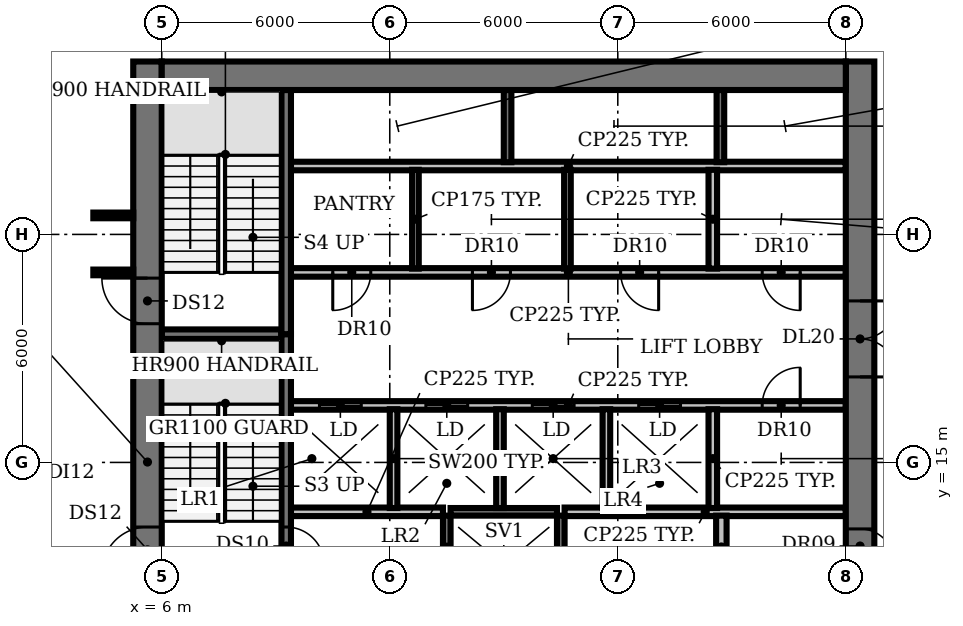
"""IFC4 building model, lengths in metres.
Left out: names, types, materials, properties, quantities, classifications, styles, units other than length and angle.
Written with IfcOpenShell. Run it as: python <this file> out.ifc"""

import sys

from ifc_helpers import new_model, si_unit, direction, frame, frame_2d, origin, place, context, subcontext, project, spatial, rectangle, extrude, element, fill, save


model = new_model("IFC4")
c1 = context("Model", 3, precision=1e-05, world=origin(), true_north=direction((0.0, 1.0)))
c2 = subcontext(c1, "Body", "Model", "MODEL_VIEW")
j1 = project(units=[si_unit("LENGTHUNIT", "METRE"), si_unit("PLANEANGLEUNIT", "RADIAN")], contexts=[c1])
p1 = place(None, origin())
s1 = spatial("IfcSite", under=j1, at=p1, CompositionType="ELEMENT")
p2 = place(p1, origin())
s2 = spatial("IfcBuilding", under=s1, at=p2, CompositionType="ELEMENT")
p3 = place(p2, frame((0.0, 0.0, 129.8)))
s3 = spatial("IfcBuildingStorey", under=s2, at=p3, CompositionType="ELEMENT", Elevation=129.8)
p4 = place(p3, frame((9.4, 13.7, 0.0), z_axis=(0.0, 0.0, 1.0), x_axis=(1.0, 0.0, 0.0)))
e1 = element("IfcWall", 1, at=p4, inside=s3, PredefinedType="PARTITIONING", context=c2, shape_type="SweptSolid", body=[
    extrude(rectangle(XDim=4.0, YDim=0.225, at=frame_2d((2.0, 0.0))), origin(), (0.0, 0.0, 1.0), 3.85),
])
p5 = place(p3, frame((13.6, 13.7, 0.0), z_axis=(0.0, 0.0, 1.0), x_axis=(1.0, 0.0, 0.0)))
e2 = element("IfcWall", 2, at=p5, inside=s3, PredefinedType="SHEAR", context=c2, shape_type="SweptSolid", body=[
    extrude(rectangle(XDim=2.8, YDim=0.2, at=frame_2d((1.4, 0.0))), origin(), (0.0, 0.0, 1.0), 3.85),
])
p6 = place(p3, frame((16.6, 13.7, 0.0), z_axis=(0.0, 0.0, 1.0), x_axis=(1.0, 0.0, 0.0)))
e3 = element("IfcWall", 3, at=p6, inside=s3, PredefinedType="PARTITIONING", context=c2, shape_type="SweptSolid", body=[
    extrude(rectangle(XDim=7.4, YDim=0.225, at=frame_2d((3.7, 0.0))), origin(), (0.0, 0.0, 1.0), 3.85),
])
p7 = place(p3, frame((9.4, 16.5, 0.0), z_axis=(0.0, 0.0, 1.0), x_axis=(1.0, 0.0, 0.0)))
e4 = element("IfcWall", 4, at=p7, inside=s3, PredefinedType="PARTITIONING", context=c2, shape_type="SweptSolid", body=[
    extrude(rectangle(XDim=14.6, YDim=0.225, at=frame_2d((7.3, 0.0))), origin(), (0.0, 0.0, 1.0), 3.85),
])
p8 = place(p7, frame((0.75, 0.0, 0.0)))
e5 = element("IfcOpeningElement", 5, at=p8, cuts=e4, PredefinedType="OPENING", context=c2, shape_type="SweptSolid", body=[
    extrude(rectangle(XDim=1.1, YDim=2.1, at=frame_2d((0.55, 1.05))), frame((0.0, 0.123, 0.0), z_axis=(0.0, -1.0, 0.0), x_axis=(1.0, 0.0, 0.0)), (0.0, 0.0, 1.0), 0.245),
])
p9 = place(p7, frame((3.55, 0.0, 0.0)))
e6 = element("IfcOpeningElement", 6, at=p9, cuts=e4, PredefinedType="OPENING", context=c2, shape_type="SweptSolid", body=[
    extrude(rectangle(XDim=1.1, YDim=2.1, at=frame_2d((0.55, 1.05))), frame((0.0, 0.123, 0.0), z_axis=(0.0, -1.0, 0.0), x_axis=(1.0, 0.0, 0.0)), (0.0, 0.0, 1.0), 0.245),
])
p10 = place(p7, frame((6.35, 0.0, 0.0)))
e7 = element("IfcOpeningElement", 7, at=p10, cuts=e4, PredefinedType="OPENING", context=c2, shape_type="SweptSolid", body=[
    extrude(rectangle(XDim=1.1, YDim=2.1, at=frame_2d((0.55, 1.05))), frame((0.0, 0.123, 0.0), z_axis=(0.0, -1.0, 0.0), x_axis=(1.0, 0.0, 0.0)), (0.0, 0.0, 1.0), 0.245),
])
p11 = place(p7, frame((9.15, 0.0, 0.0)))
e8 = element("IfcOpeningElement", 8, at=p11, cuts=e4, PredefinedType="OPENING", context=c2, shape_type="SweptSolid", body=[
    extrude(rectangle(XDim=1.1, YDim=2.1, at=frame_2d((0.55, 1.05))), frame((0.0, 0.123, 0.0), z_axis=(0.0, -1.0, 0.0), x_axis=(1.0, 0.0, 0.0)), (0.0, 0.0, 1.0), 0.245),
])
p12 = place(p7, frame((12.4, 0.0, 0.0)))
e9 = element("IfcOpeningElement", 9, at=p12, cuts=e4, PredefinedType="OPENING", context=c2, shape_type="SweptSolid", body=[
    extrude(rectangle(XDim=1.0, YDim=2.1, at=frame_2d((0.5, 1.05))), frame((0.0, 0.123, 0.0), z_axis=(0.0, -1.0, 0.0), x_axis=(1.0, 0.0, 0.0)), (0.0, 0.0, 1.0), 0.245),
])
p13 = place(p3, frame((6.0, 18.375, 0.0), z_axis=(0.0, 0.0, 1.0), x_axis=(1.0, 0.0, 0.0)))
e10 = element("IfcWall", 10, at=p13, inside=s3, PredefinedType="SHEAR", context=c2, shape_type="SweptSolid", body=[
    extrude(rectangle(XDim=3.15, YDim=0.25, at=frame_2d((1.575, 0.0))), origin(), (0.0, 0.0, 1.0), 3.85),
])
p14 = place(p3, frame((24.0, 20.0, 0.0), z_axis=(0.0, 0.0, 1.0), x_axis=(-1.0, 0.0, 0.0)))
e11 = element("IfcWall", 11, at=p14, inside=s3, PredefinedType="PARTITIONING", context=c2, shape_type="SweptSolid", body=[
    extrude(rectangle(XDim=14.6, YDim=0.225, at=frame_2d((7.3, 0.0))), origin(), (0.0, 0.0, 1.0), 3.85),
])
p15 = place(p14, frame((12.5, 0.0, 0.0)))
e12 = element("IfcOpeningElement", 12, at=p15, cuts=e11, PredefinedType="OPENING", context=c2, shape_type="SweptSolid", body=[
    extrude(rectangle(XDim=1.0, YDim=2.1, at=frame_2d((0.5, 1.05))), frame((0.0, 0.123, 0.0), z_axis=(0.0, -1.0, 0.0), x_axis=(1.0, 0.0, 0.0)), (0.0, 0.0, 1.0), 0.245),
])
p16 = place(p14, frame((8.825, 0.0, 0.0)))
e13 = element("IfcOpeningElement", 13, at=p16, cuts=e11, PredefinedType="OPENING", context=c2, shape_type="SweptSolid", body=[
    extrude(rectangle(XDim=1.0, YDim=2.1, at=frame_2d((0.5, 1.05))), frame((0.0, 0.123, 0.0), z_axis=(0.0, -1.0, 0.0), x_axis=(1.0, 0.0, 0.0)), (0.0, 0.0, 1.0), 0.245),
])
p17 = place(p14, frame((4.925, 0.0, 0.0)))
e14 = element("IfcOpeningElement", 14, at=p17, cuts=e11, PredefinedType="OPENING", context=c2, shape_type="SweptSolid", body=[
    extrude(rectangle(XDim=1.0, YDim=2.1, at=frame_2d((0.5, 1.05))), frame((0.0, 0.123, 0.0), z_axis=(0.0, -1.0, 0.0), x_axis=(1.0, 0.0, 0.0)), (0.0, 0.0, 1.0), 0.245),
])
p18 = place(p14, frame((1.2, 0.0, 0.0)))
e15 = element("IfcOpeningElement", 15, at=p18, cuts=e11, PredefinedType="OPENING", context=c2, shape_type="SweptSolid", body=[
    extrude(rectangle(XDim=1.0, YDim=2.1, at=frame_2d((0.5, 1.05))), frame((0.0, 0.123, 0.0), z_axis=(0.0, -1.0, 0.0), x_axis=(1.0, 0.0, 0.0)), (0.0, 0.0, 1.0), 0.245),
])
p19 = place(p3, frame((9.4, 22.8, 0.0), z_axis=(0.0, 0.0, 1.0), x_axis=(1.0, 0.0, 0.0)))
e16 = element("IfcWall", 16, at=p19, inside=s3, PredefinedType="PARTITIONING", context=c2, shape_type="SweptSolid", body=[
    extrude(rectangle(XDim=14.6, YDim=0.225, at=frame_2d((7.3, 0.0))), origin(), (0.0, 0.0, 1.0), 3.85),
])
p20 = place(p3, frame((9.275, 18.375, 0.0), z_axis=(0.0, 0.0, 1.0), x_axis=(0.0, -1.0, 0.0)))
e17 = element("IfcWall", 17, at=p20, inside=s3, PredefinedType="SHEAR", context=c2, shape_type="SweptSolid", body=[
    extrude(rectangle(XDim=6.55, YDim=0.25, at=frame_2d((3.275, 0.0))), origin(), (0.0, 0.0, 1.0), 3.85),
])
p21 = place(p20, frame((5.075, 0.0, 0.0)))
e18 = element("IfcOpeningElement", 18, at=p21, cuts=e17, PredefinedType="OPENING", context=c2, shape_type="SweptSolid", body=[
    extrude(rectangle(XDim=1.0, YDim=2.1, at=frame_2d((0.5, 1.05))), frame((0.0, 0.135, 0.0), z_axis=(0.0, -1.0, 0.0), x_axis=(1.0, 0.0, 0.0)), (0.0, 0.0, 1.0), 0.27),
])
p22 = place(p3, frame((9.275, 18.375, 0.0), z_axis=(0.0, 0.0, 1.0), x_axis=(0.0, 1.0, 0.0)))
e19 = element("IfcWall", 19, at=p22, inside=s3, PredefinedType="SHEAR", context=c2, shape_type="SweptSolid", body=[
    extrude(rectangle(XDim=6.425, YDim=0.25, at=frame_2d((3.212, 0.0))), origin(), (0.0, 0.0, 1.0), 3.85),
])
p23 = place(p3, frame((12.1, 13.8, 0.0), z_axis=(0.0, 0.0, 1.0), x_axis=(0.0, 1.0, 0.0)))
e20 = element("IfcWall", 20, at=p23, inside=s3, PredefinedType="SOLIDWALL", context=c2, shape_type="SweptSolid", body=[
    extrude(rectangle(XDim=2.6, YDim=0.2, at=frame_2d((1.3, 0.0))), origin(), (0.0, 0.0, 1.0), 3.85),
])
p24 = place(p3, frame((12.675, 20.1, 0.0), z_axis=(0.0, 0.0, 1.0), x_axis=(0.0, 1.0, 0.0)))
e21 = element("IfcWall", 21, at=p24, inside=s3, PredefinedType="PARTITIONING", context=c2, shape_type="SweptSolid", body=[
    extrude(rectangle(XDim=2.6, YDim=0.175, at=frame_2d((1.3, 0.0))), origin(), (0.0, 0.0, 1.0), 3.85),
])
p25 = place(p3, frame((13.5, 5.4, 0.0), z_axis=(0.0, 0.0, 1.0), x_axis=(0.0, 1.0, 0.0)))
e22 = element("IfcWall", 22, at=p25, inside=s3, PredefinedType="SHEAR", context=c2, shape_type="SweptSolid", body=[
    extrude(rectangle(XDim=8.2, YDim=0.2, at=frame_2d((4.1, 0.0))), origin(), (0.0, 0.0, 1.0), 3.85),
])
p26 = place(p25, frame((0.75, 0.0, 0.0)))
e23 = element("IfcOpeningElement", 23, at=p26, cuts=e22, PredefinedType="OPENING", context=c2, shape_type="SweptSolid", body=[
    extrude(rectangle(XDim=1.1, YDim=2.1, at=frame_2d((0.55, 1.05))), frame((0.0, 0.11, 0.0), z_axis=(0.0, -1.0, 0.0), x_axis=(1.0, 0.0, 0.0)), (0.0, 0.0, 1.0), 0.22),
])
p27 = place(p25, frame((3.55, 0.0, 0.0)))
e24 = element("IfcOpeningElement", 24, at=p27, cuts=e22, PredefinedType="OPENING", context=c2, shape_type="SweptSolid", body=[
    extrude(rectangle(XDim=1.1, YDim=2.1, at=frame_2d((0.55, 1.05))), frame((0.0, 0.11, 0.0), z_axis=(0.0, -1.0, 0.0), x_axis=(1.0, 0.0, 0.0)), (0.0, 0.0, 1.0), 0.22),
])
p28 = place(p25, frame((6.35, 0.0, 0.0)))
e25 = element("IfcOpeningElement", 25, at=p28, cuts=e22, PredefinedType="OPENING", context=c2, shape_type="SweptSolid", body=[
    extrude(rectangle(XDim=1.1, YDim=2.1, at=frame_2d((0.55, 1.05))), frame((0.0, 0.11, 0.0), z_axis=(0.0, -1.0, 0.0), x_axis=(1.0, 0.0, 0.0)), (0.0, 0.0, 1.0), 0.22),
])
p29 = place(p3, frame((14.9, 13.8, 0.0), z_axis=(0.0, 0.0, 1.0), x_axis=(0.0, 1.0, 0.0)))
e26 = element("IfcWall", 26, at=p29, inside=s3, PredefinedType="SOLIDWALL", context=c2, shape_type="SweptSolid", body=[
    extrude(rectangle(XDim=2.6, YDim=0.2, at=frame_2d((1.3, 0.0))), origin(), (0.0, 0.0, 1.0), 3.85),
])
p30 = place(p3, frame((15.1, 22.9, 0.0), z_axis=(0.0, 0.0, 1.0), x_axis=(0.0, 1.0, 0.0)))
e27 = element("IfcWall", 27, at=p30, inside=s3, PredefinedType="SHEAR", context=c2, shape_type="SweptSolid", body=[
    extrude(rectangle(XDim=1.9, YDim=0.2, at=frame_2d((0.95, 0.0))), origin(), (0.0, 0.0, 1.0), 3.85),
])
p31 = place(p3, frame((16.5, 5.4, 0.0), z_axis=(0.0, 0.0, 1.0), x_axis=(0.0, 1.0, 0.0)))
e28 = element("IfcWall", 28, at=p31, inside=s3, PredefinedType="SHEAR", context=c2, shape_type="SweptSolid", body=[
    extrude(rectangle(XDim=8.2, YDim=0.2, at=frame_2d((4.1, 0.0))), origin(), (0.0, 0.0, 1.0), 3.85),
])
p32 = place(p3, frame((16.675, 20.1, 0.0), z_axis=(0.0, 0.0, 1.0), x_axis=(0.0, 1.0, 0.0)))
e29 = element("IfcWall", 29, at=p32, inside=s3, PredefinedType="PARTITIONING", context=c2, shape_type="SweptSolid", body=[
    extrude(rectangle(XDim=2.6, YDim=0.175, at=frame_2d((1.3, 0.0))), origin(), (0.0, 0.0, 1.0), 3.85),
])
p33 = place(p3, frame((17.7, 13.8, 0.0), z_axis=(0.0, 0.0, 1.0), x_axis=(0.0, 1.0, 0.0)))
e30 = element("IfcWall", 30, at=p33, inside=s3, PredefinedType="SOLIDWALL", context=c2, shape_type="SweptSolid", body=[
    extrude(rectangle(XDim=2.6, YDim=0.2, at=frame_2d((1.3, 0.0))), origin(), (0.0, 0.0, 1.0), 3.85),
])
for number, where, z_axis, x_axis in (
    (31, (20.5, 13.8, 0.0), (0.0, 0.0, 1.0), (0.0, 1.0, 0.0)),
    (32, (20.5, 20.1, 0.0), (0.0, 0.0, 1.0), (0.0, 1.0, 0.0)),
):
    element("IfcWall", number, at=place(p3, frame(where, z_axis=z_axis, x_axis=x_axis)), inside=s3, PredefinedType="PARTITIONING", context=c2, shape_type="SweptSolid", body=[
        extrude(rectangle(XDim=2.6, YDim=0.225, at=frame_2d((1.3, 0.0))), origin(), (0.0, 0.0, 1.0), 3.85),
    ])
p34 = place(p3, frame((20.7, 22.9, 0.0), z_axis=(0.0, 0.0, 1.0), x_axis=(0.0, 1.0, 0.0)))
e33 = element("IfcWall", 33, at=p34, inside=s3, PredefinedType="SHEAR", context=c2, shape_type="SweptSolid", body=[
    extrude(rectangle(XDim=1.9, YDim=0.2, at=frame_2d((0.95, 0.0))), origin(), (0.0, 0.0, 1.0), 3.85),
])
p35 = place(p3, frame((20.725, 11.95, 0.0), z_axis=(0.0, 0.0, 1.0), x_axis=(0.0, 1.0, 0.0)))
e34 = element("IfcWall", 34, at=p35, inside=s3, PredefinedType="PARTITIONING", context=c2, shape_type="SweptSolid", body=[
    extrude(rectangle(XDim=1.65, YDim=0.275, at=frame_2d((0.825, 0.0))), origin(), (0.0, 0.0, 1.0), 3.85),
])
p36 = place(p3, frame((5.625, 4.47, 0.0), z_axis=(0.0, 0.0, 1.0), x_axis=(0.0, 1.0, 0.0)))
e35 = element("IfcWall", 35, at=p36, inside=s3, PredefinedType="SHEAR", context=c2, shape_type="SweptSolid", body=[
    extrude(rectangle(XDim=21.08, YDim=0.75, at=frame_2d((10.54, 0.0))), origin(), (0.0, 0.0, 1.0), 3.85),
])
p37 = place(p36, frame((1.18, 0.0, 0.0)))
e36 = element("IfcOpeningElement", 36, at=p37, cuts=e35, PredefinedType="OPENING", context=c2, shape_type="SweptSolid", body=[
    extrude(rectangle(XDim=1.5, YDim=2.1, at=frame_2d((0.75, 1.05))), frame((0.0, 0.385, 0.0), z_axis=(0.0, -1.0, 0.0), x_axis=(1.0, 0.0, 0.0)), (0.0, 0.0, 1.0), 0.77),
])
p38 = place(p36, frame((7.63, 0.0, 0.0)))
e37 = element("IfcOpeningElement", 37, at=p38, cuts=e35, PredefinedType="OPENING", context=c2, shape_type="SweptSolid", body=[
    extrude(rectangle(XDim=1.2, YDim=2.1, at=frame_2d((0.6, 1.05))), frame((0.0, 0.385, 0.0), z_axis=(0.0, -1.0, 0.0), x_axis=(1.0, 0.0, 0.0)), (0.0, 0.0, 1.0), 0.77),
])
p39 = place(p36, frame((14.18, 0.0, 0.0)))
e38 = element("IfcOpeningElement", 38, at=p39, cuts=e35, PredefinedType="OPENING", context=c2, shape_type="SweptSolid", body=[
    extrude(rectangle(XDim=1.2, YDim=2.1, at=frame_2d((0.6, 1.05))), frame((0.0, 0.385, 0.0), z_axis=(0.0, -1.0, 0.0), x_axis=(1.0, 0.0, 0.0)), (0.0, 0.0, 1.0), 0.77),
])
p40 = place(p3, frame((24.375, 25.55, 0.0), z_axis=(0.0, 0.0, 1.0), x_axis=(0.0, -1.0, 0.0)))
e39 = element("IfcWall", 39, at=p40, inside=s3, PredefinedType="SHEAR", context=c2, shape_type="SweptSolid", body=[
    extrude(rectangle(XDim=21.13, YDim=0.75, at=frame_2d((10.565, 0.0))), origin(), (0.0, 0.0, 1.0), 3.85),
])
p41 = place(p40, frame((18.4, 0.0, 0.0)))
e40 = element("IfcOpeningElement", 40, at=p41, cuts=e39, PredefinedType="OPENING", context=c2, shape_type="SweptSolid", body=[
    extrude(rectangle(XDim=1.5, YDim=2.1, at=frame_2d((0.75, 1.05))), frame((0.0, 0.385, 0.0), z_axis=(0.0, -1.0, 0.0), x_axis=(1.0, 0.0, 0.0)), (0.0, 0.0, 1.0), 0.77),
])
p42 = place(p40, frame((12.3, 0.0, 0.0)))
e41 = element("IfcOpeningElement", 41, at=p42, cuts=e39, PredefinedType="OPENING", context=c2, shape_type="SweptSolid", body=[
    extrude(rectangle(XDim=0.9, YDim=2.1, at=frame_2d((0.45, 1.05))), frame((0.0, 0.385, 0.0), z_axis=(0.0, -1.0, 0.0), x_axis=(1.0, 0.0, 0.0)), (0.0, 0.0, 1.0), 0.77),
])
p43 = place(p40, frame((6.3, 0.0, 0.0)))
e42 = element("IfcOpeningElement", 42, at=p43, cuts=e39, PredefinedType="OPENING", context=c2, shape_type="SweptSolid", body=[
    extrude(rectangle(XDim=2.0, YDim=2.1, at=frame_2d((1.0, 1.05))), frame((0.0, 0.385, 0.0), z_axis=(0.0, -1.0, 0.0), x_axis=(1.0, 0.0, 0.0)), (0.0, 0.0, 1.0), 0.77),
])
p44 = place(p3, frame((6.0, 25.175, 0.0), z_axis=(0.0, 0.0, 1.0), x_axis=(1.0, 0.0, 0.0)))
e43 = element("IfcWall", 43, at=p44, inside=s3, PredefinedType="SHEAR", context=c2, shape_type="SweptSolid", body=[
    extrude(rectangle(XDim=18.0, YDim=0.75, at=frame_2d((9.0, 0.0))), origin(), (0.0, 0.0, 1.0), 3.85),
])
for number, where, z_axis, x_axis in (
    (44, (4.2, 20.0, 0.0), (0.0, 0.0, 1.0), (1.0, 0.0, 0.0)),
    (45, (4.2, 21.5, 0.0), (0.0, 0.0, 1.0), (1.0, 0.0, 0.0)),
):
    element("IfcWall", number, at=place(p3, frame(where, z_axis=z_axis, x_axis=x_axis)), inside=s3, PredefinedType="PARTITIONING", context=c2, shape_type="SweptSolid", body=[
        extrude(rectangle(XDim=1.05, YDim=0.15, at=frame_2d((0.525, 0.0))), origin(), (0.0, 0.0, 1.0), 2.83),
    ])
p45 = place(p8, origin())
e46 = element("IfcDoor", 46, at=p45, inside=s3, OperationType="DOUBLE_DOOR_SLIDING", PredefinedType="DOOR", context=c2, shape_type="SweptSolid", body=[
    extrude(rectangle(XDim=1.1, YDim=2.1, at=frame_2d((0.55, 1.05))), frame((0.0, 0.025, 0.0), z_axis=(0.0, -1.0, 0.0), x_axis=(1.0, 0.0, 0.0)), (0.0, 0.0, 1.0), 0.05),
])
fill(e5, e46)
p46 = place(p9, origin())
e47 = element("IfcDoor", 47, at=p46, inside=s3, OperationType="DOUBLE_DOOR_SLIDING", PredefinedType="DOOR", context=c2, shape_type="SweptSolid", body=[
    extrude(rectangle(XDim=1.1, YDim=2.1, at=frame_2d((0.55, 1.05))), frame((0.0, 0.025, 0.0), z_axis=(0.0, -1.0, 0.0), x_axis=(1.0, 0.0, 0.0)), (0.0, 0.0, 1.0), 0.05),
])
fill(e6, e47)
p47 = place(p10, origin())
e48 = element("IfcDoor", 48, at=p47, inside=s3, OperationType="DOUBLE_DOOR_SLIDING", PredefinedType="DOOR", context=c2, shape_type="SweptSolid", body=[
    extrude(rectangle(XDim=1.1, YDim=2.1, at=frame_2d((0.55, 1.05))), frame((0.0, 0.025, 0.0), z_axis=(0.0, -1.0, 0.0), x_axis=(1.0, 0.0, 0.0)), (0.0, 0.0, 1.0), 0.05),
])
fill(e7, e48)
p48 = place(p11, origin())
e49 = element("IfcDoor", 49, at=p48, inside=s3, OperationType="DOUBLE_DOOR_SLIDING", PredefinedType="DOOR", context=c2, shape_type="SweptSolid", body=[
    extrude(rectangle(XDim=1.1, YDim=2.1, at=frame_2d((0.55, 1.05))), frame((0.0, 0.025, 0.0), z_axis=(0.0, -1.0, 0.0), x_axis=(1.0, 0.0, 0.0)), (0.0, 0.0, 1.0), 0.05),
])
fill(e8, e49)
p49 = place(p12, origin())
e50 = element("IfcDoor", 50, at=p49, inside=s3, OperationType="SINGLE_SWING_RIGHT", PredefinedType="DOOR", context=c2, shape_type="SweptSolid", body=[
    extrude(rectangle(XDim=1.0, YDim=2.1, at=frame_2d((0.5, 1.05))), frame((0.0, 0.025, 0.0), z_axis=(0.0, -1.0, 0.0), x_axis=(1.0, 0.0, 0.0)), (0.0, 0.0, 1.0), 0.05),
])
fill(e9, e50)
p50 = place(p15, origin())
e51 = element("IfcDoor", 51, at=p50, inside=s3, OperationType="SINGLE_SWING_RIGHT", PredefinedType="DOOR", context=c2, shape_type="SweptSolid", body=[
    extrude(rectangle(XDim=1.0, YDim=2.1, at=frame_2d((0.5, 1.05))), frame((0.0, 0.025, 0.0), z_axis=(0.0, -1.0, 0.0), x_axis=(1.0, 0.0, 0.0)), (0.0, 0.0, 1.0), 0.05),
])
fill(e12, e51)
p51 = place(p16, origin())
e52 = element("IfcDoor", 52, at=p51, inside=s3, OperationType="SINGLE_SWING_RIGHT", PredefinedType="DOOR", context=c2, shape_type="SweptSolid", body=[
    extrude(rectangle(XDim=1.0, YDim=2.1, at=frame_2d((0.5, 1.05))), frame((0.0, 0.025, 0.0), z_axis=(0.0, -1.0, 0.0), x_axis=(1.0, 0.0, 0.0)), (0.0, 0.0, 1.0), 0.05),
])
fill(e13, e52)
p52 = place(p17, origin())
e53 = element("IfcDoor", 53, at=p52, inside=s3, OperationType="SINGLE_SWING_LEFT", PredefinedType="DOOR", context=c2, shape_type="SweptSolid", body=[
    extrude(rectangle(XDim=1.0, YDim=2.1, at=frame_2d((0.5, 1.05))), frame((0.0, 0.025, 0.0), z_axis=(0.0, -1.0, 0.0), x_axis=(1.0, 0.0, 0.0)), (0.0, 0.0, 1.0), 0.05),
])
fill(e14, e53)
p53 = place(p18, origin())
e54 = element("IfcDoor", 54, at=p53, inside=s3, OperationType="SINGLE_SWING_LEFT", PredefinedType="DOOR", context=c2, shape_type="SweptSolid", body=[
    extrude(rectangle(XDim=1.0, YDim=2.1, at=frame_2d((0.5, 1.05))), frame((0.0, 0.025, 0.0), z_axis=(0.0, -1.0, 0.0), x_axis=(1.0, 0.0, 0.0)), (0.0, 0.0, 1.0), 0.05),
])
fill(e15, e54)
p54 = place(p21, origin())
e55 = element("IfcDoor", 55, at=p54, inside=s3, OperationType="SINGLE_SWING_RIGHT", PredefinedType="DOOR", context=c2, shape_type="SweptSolid", body=[
    extrude(rectangle(XDim=1.0, YDim=2.1, at=frame_2d((0.5, 1.05))), frame((0.0, 0.025, 0.0), z_axis=(0.0, -1.0, 0.0), x_axis=(1.0, 0.0, 0.0)), (0.0, 0.0, 1.0), 0.05),
])
fill(e18, e55)
p55 = place(p28, origin())
e56 = element("IfcDoor", 56, at=p55, inside=s3, OperationType="DOUBLE_DOOR_SLIDING", PredefinedType="DOOR", context=c2, shape_type="SweptSolid", body=[
    extrude(rectangle(XDim=1.1, YDim=2.1, at=frame_2d((0.55, 1.05))), frame((0.0, 0.025, 0.0), z_axis=(0.0, -1.0, 0.0), x_axis=(1.0, 0.0, 0.0)), (0.0, 0.0, 1.0), 0.05),
])
fill(e25, e56)
p56 = place(p38, origin())
e57 = element("IfcDoor", 57, at=p56, inside=s3, OperationType="SINGLE_SWING_LEFT", PredefinedType="DOOR", context=c2, shape_type="SweptSolid", body=[
    extrude(rectangle(XDim=1.2, YDim=2.1, at=frame_2d((0.6, 1.05))), frame((0.0, 0.025, 0.0), z_axis=(0.0, -1.0, 0.0), x_axis=(1.0, 0.0, 0.0)), (0.0, 0.0, 1.0), 0.05),
])
fill(e37, e57)
p57 = place(p39, origin())
e58 = element("IfcDoor", 58, at=p57, inside=s3, OperationType="SINGLE_SWING_RIGHT", PredefinedType="DOOR", context=c2, shape_type="SweptSolid", body=[
    extrude(rectangle(XDim=1.2, YDim=2.1, at=frame_2d((0.6, 1.05))), frame((0.0, 0.025, 0.0), z_axis=(0.0, -1.0, 0.0), x_axis=(1.0, 0.0, 0.0)), (0.0, 0.0, 1.0), 0.05),
])
fill(e38, e58)
p58 = place(p42, origin())
e59 = element("IfcDoor", 59, at=p58, inside=s3, OperationType="SINGLE_SWING_RIGHT", PredefinedType="DOOR", context=c2, shape_type="SweptSolid", body=[
    extrude(rectangle(XDim=0.9, YDim=2.1, at=frame_2d((0.45, 1.05))), frame((0.0, -0.315, 0.0), z_axis=(0.0, -1.0, 0.0), x_axis=(1.0, 0.0, 0.0)), (0.0, 0.0, 1.0), 0.05),
])
fill(e41, e59)
p59 = place(p43, origin())
e60 = element("IfcDoor", 60, at=p59, inside=s3, OperationType="DOUBLE_DOOR_SINGLE_SWING", PredefinedType="DOOR", context=c2, shape_type="SweptSolid", body=[
    extrude(rectangle(XDim=2.0, YDim=2.1, at=frame_2d((1.0, 1.05))), frame((0.0, 0.025, 0.0), z_axis=(0.0, -1.0, 0.0), x_axis=(1.0, 0.0, 0.0)), (0.0, 0.0, 1.0), 0.05),
])
fill(e42, e60)
save(model, sys.argv[1])
